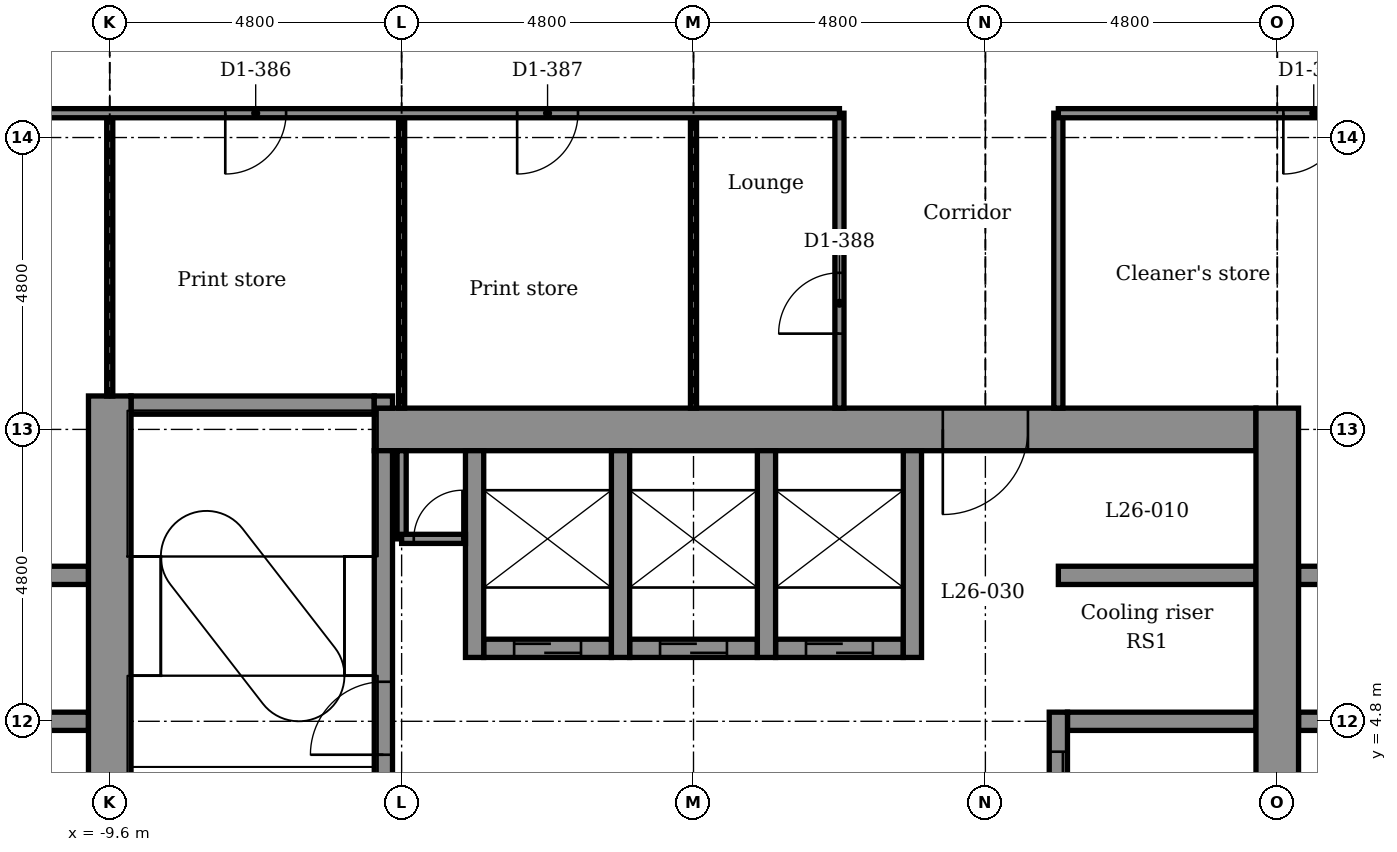
"""IFC4 building model, lengths in metres.
Left out: names, types, materials, properties, quantities, classifications, styles, units other than length and angle.
Written with IfcOpenShell. Run it as: python <this file> out.ifc"""

import sys

from ifc_helpers import new_model, si_unit, direction, frame, frame_2d, origin, place, context, subcontext, project, spatial, rectangle, extrude, element, fill, save


model = new_model("IFC4")
c1 = context("Model", 3, precision=1e-05, world=origin(), true_north=direction((0.0, 1.0)))
c2 = subcontext(c1, "Body", "Model", "MODEL_VIEW")
j1 = project(units=[si_unit("LENGTHUNIT", "METRE"), si_unit("PLANEANGLEUNIT", "RADIAN")], contexts=[c1])
p1 = place(None, origin())
s1 = spatial("IfcSite", under=j1, at=p1, CompositionType="ELEMENT")
p2 = place(p1, origin())
s2 = spatial("IfcBuilding", under=s1, at=p2, CompositionType="ELEMENT")
p3 = place(p2, frame((0.0, 0.0, 133.4)))
s3 = spatial("IfcBuildingStorey", under=s2, at=p3, CompositionType="ELEMENT", Elevation=133.4)
p4 = place(p3, frame((-14.25, 4.8, -0.15), z_axis=(0.0, 0.0, 1.0), x_axis=(1.0, 0.0, 0.0)))
e1 = element("IfcWall", 1, at=p4, inside=s3, PredefinedType="STANDARD", context=c2, shape_type="SweptSolid", body=[
    extrude(rectangle(XDim=4.3, YDim=0.3, at=frame_2d((2.15, 0.0))), origin(), (0.0, 0.0, 1.0), 4.55),
])
p5 = place(p3, frame((6.15, 4.8, -0.15), z_axis=(0.0, 0.0, 1.0), x_axis=(1.0, 0.0, 0.0)))
e2 = element("IfcWall", 2, at=p5, inside=s3, PredefinedType="STANDARD", context=c2, shape_type="SweptSolid", body=[
    extrude(rectangle(XDim=3.1, YDim=0.3, at=frame_2d((1.55, 0.0))), origin(), (0.0, 0.0, 1.0), 5.4),
])
p6 = place(p3, frame((9.95, 4.8, -0.15), z_axis=(0.0, 0.0, 1.0), x_axis=(1.0, 0.0, 0.0)))
e3 = element("IfcWall", 3, at=p6, inside=s3, PredefinedType="STANDARD", context=c2, shape_type="SweptSolid", body=[
    extrude(rectangle(XDim=4.3, YDim=0.3, at=frame_2d((2.15, 0.0))), origin(), (0.0, 0.0, 1.0), 4.55),
])
p7 = place(p3, frame((-3.45, 6.0, -0.15), z_axis=(0.0, 0.0, 1.0), x_axis=(1.0, 0.0, 0.0)))
e4 = element("IfcWall", 4, at=p7, inside=s3, PredefinedType="STANDARD", context=c2, shape_type="SweptSolid", body=[
    extrude(rectangle(XDim=2.1, YDim=0.3, at=frame_2d((1.05, 0.0))), origin(), (0.0, 0.0, 1.0), 5.4),
])
p8 = place(p7, frame((0.5, 0.0, 0.15)))
e5 = element("IfcOpeningElement", 5, at=p8, cuts=e4, PredefinedType="OPENING", context=c2, shape_type="SweptSolid", body=[
    extrude(rectangle(XDim=1.1, YDim=2.1, at=frame_2d((0.55, 1.05))), frame((0.0, 0.16, 0.0), z_axis=(0.0, -1.0, 0.0), x_axis=(1.0, 0.0, 0.0)), (0.0, 0.0, 1.0), 0.32),
])
p9 = place(p3, frame((-1.05, 6.0, -0.15), z_axis=(0.0, 0.0, 1.0), x_axis=(1.0, 0.0, 0.0)))
e6 = element("IfcWall", 6, at=p9, inside=s3, PredefinedType="STANDARD", context=c2, shape_type="SweptSolid", body=[
    extrude(rectangle(XDim=2.1, YDim=0.3, at=frame_2d((1.05, 0.0))), origin(), (0.0, 0.0, 1.0), 5.4),
])
p10 = place(p9, frame((0.5, 0.0, 0.15)))
e7 = element("IfcOpeningElement", 7, at=p10, cuts=e6, PredefinedType="OPENING", context=c2, shape_type="SweptSolid", body=[
    extrude(rectangle(XDim=1.1, YDim=2.1, at=frame_2d((0.55, 1.05))), frame((0.0, 0.16, 0.0), z_axis=(0.0, -1.0, 0.0), x_axis=(1.0, 0.0, 0.0)), (0.0, 0.0, 1.0), 0.32),
])
p11 = place(p3, frame((1.35, 6.0, -0.15), z_axis=(0.0, 0.0, 1.0), x_axis=(1.0, 0.0, 0.0)))
e8 = element("IfcWall", 8, at=p11, inside=s3, PredefinedType="STANDARD", context=c2, shape_type="SweptSolid", body=[
    extrude(rectangle(XDim=2.1, YDim=0.3, at=frame_2d((1.05, 0.0))), origin(), (0.0, 0.0, 1.0), 5.4),
])
p12 = place(p11, frame((0.5, 0.0, 0.15)))
e9 = element("IfcOpeningElement", 9, at=p12, cuts=e8, PredefinedType="OPENING", context=c2, shape_type="SweptSolid", body=[
    extrude(rectangle(XDim=1.1, YDim=2.1, at=frame_2d((0.55, 1.05))), frame((0.0, 0.16, 0.0), z_axis=(0.0, -1.0, 0.0), x_axis=(1.0, 0.0, 0.0)), (0.0, 0.0, 1.0), 0.32),
])
p13 = place(p3, frame((-14.25, 7.2, -0.15), z_axis=(0.0, 0.0, 1.0), x_axis=(1.0, 0.0, 0.0)))
e10 = element("IfcWall", 10, at=p13, inside=s3, PredefinedType="STANDARD", context=c2, shape_type="SweptSolid", body=[
    extrude(rectangle(XDim=4.3, YDim=0.3, at=frame_2d((2.15, 0.0))), origin(), (0.0, 0.0, 1.0), 4.55),
])
p14 = place(p3, frame((6.0, 7.2, -0.15), z_axis=(0.0, 0.0, 1.0), x_axis=(1.0, 0.0, 0.0)))
e11 = element("IfcWall", 11, at=p14, inside=s3, PredefinedType="STANDARD", context=c2, shape_type="SweptSolid", body=[
    extrude(rectangle(XDim=3.25, YDim=0.3, at=frame_2d((1.625, 0.0))), origin(), (0.0, 0.0, 1.0), 5.4),
])
p15 = place(p3, frame((9.95, 7.2, -0.15), z_axis=(0.0, 0.0, 1.0), x_axis=(1.0, 0.0, 0.0)))
e12 = element("IfcWall", 12, at=p15, inside=s3, PredefinedType="STANDARD", context=c2, shape_type="SweptSolid", body=[
    extrude(rectangle(XDim=4.3, YDim=0.3, at=frame_2d((2.15, 0.0))), origin(), (0.0, 0.0, 1.0), 4.55),
])
p16 = place(p3, frame((-5.25, 9.6, -0.15), z_axis=(0.0, 0.0, 1.0), x_axis=(1.0, 0.0, 0.0)))
e13 = element("IfcWall", 13, at=p16, inside=s3, PredefinedType="SHEAR", context=c2, shape_type="SweptSolid", body=[
    extrude(rectangle(XDim=14.5, YDim=0.7, at=frame_2d((7.25, 0.0))), origin(), (0.0, 0.0, 1.0), 5.4),
])
p17 = place(p16, frame((9.35, 0.0, 0.15)))
e14 = element("IfcOpeningElement", 14, at=p17, cuts=e13, PredefinedType="OPENING", context=c2, shape_type="SweptSolid", body=[
    extrude(rectangle(XDim=1.4, YDim=2.1, at=frame_2d((0.7, 1.05))), frame((0.0, 0.36, 0.0), z_axis=(0.0, -1.0, 0.0), x_axis=(1.0, 0.0, 0.0)), (0.0, 0.0, 1.0), 0.72),
])
p18 = place(p3, frame((-9.25, 10.0, -0.15), z_axis=(0.0, 0.0, 1.0), x_axis=(1.0, 0.0, 0.0)))
e15 = element("IfcWall", 15, at=p18, inside=s3, PredefinedType="STANDARD", context=c2, shape_type="SweptSolid", body=[
    extrude(rectangle(XDim=4.0, YDim=0.3, at=frame_2d((2.0, 0.0))), origin(), (0.0, 0.0, 1.0), 5.4),
])
p19 = place(p3, frame((-9.6, 2.55, -0.15), z_axis=(0.0, 0.0, 1.0), x_axis=(0.0, 1.0, 0.0)))
e16 = element("IfcWall", 16, at=p19, inside=s3, PredefinedType="SHEAR", context=c2, shape_type="SweptSolid", body=[
    extrude(rectangle(XDim=7.6, YDim=0.7, at=frame_2d((3.8, 0.0))), origin(), (0.0, 0.0, 1.0), 5.4),
])
p20 = place(p3, frame((-5.1, 2.25, -0.15), z_axis=(0.0, 0.0, 1.0), x_axis=(0.0, 1.0, 0.0)))
e17 = element("IfcWall", 17, at=p20, inside=s3, PredefinedType="STANDARD", context=c2, shape_type="SweptSolid", body=[
    extrude(rectangle(XDim=7.0, YDim=0.3, at=frame_2d((3.5, 0.0))), origin(), (0.0, 0.0, 1.0), 5.4),
])
p21 = place(p20, frame((2.0, 0.0, 0.15)))
e18 = element("IfcOpeningElement", 18, at=p21, cuts=e17, PredefinedType="OPENING", context=c2, shape_type="SweptSolid", body=[
    extrude(rectangle(XDim=1.2, YDim=2.1, at=frame_2d((0.6, 1.05))), frame((0.0, 0.16, 0.0), z_axis=(0.0, -1.0, 0.0), x_axis=(1.0, 0.0, 0.0)), (0.0, 0.0, 1.0), 0.32),
])
p22 = place(p3, frame((-5.1, 9.95, -0.15), z_axis=(0.0, 0.0, 1.0), x_axis=(0.0, 1.0, 0.0)))
e19 = element("IfcWall", 19, at=p22, inside=s3, PredefinedType="STANDARD", context=c2, shape_type="SweptSolid", body=[
    extrude(rectangle(XDim=0.2, YDim=0.3, at=frame_2d((0.1, 0.0))), origin(), (0.0, 0.0, 1.0), 5.4),
])
for number, where, z_axis, x_axis in (
    (20, (-3.6, 5.85, -0.15), (0.0, 0.0, 1.0), (0.0, 1.0, 0.0)),
    (21, (-1.2, 5.85, -0.15), (0.0, 0.0, 1.0), (0.0, 1.0, 0.0)),
    (22, (1.2, 5.85, -0.15), (0.0, 0.0, 1.0), (0.0, 1.0, 0.0)),
    (23, (3.6, 5.85, -0.15), (0.0, 0.0, 1.0), (0.0, 1.0, 0.0)),
):
    element("IfcWall", number, at=place(p3, frame(where, z_axis=z_axis, x_axis=x_axis)), inside=s3, PredefinedType="STANDARD", context=c2, shape_type="SweptSolid", body=[
        extrude(rectangle(XDim=3.4, YDim=0.3, at=frame_2d((1.7, 0.0))), origin(), (0.0, 0.0, 1.0), 5.4),
    ])
p23 = place(p3, frame((6.0, -2.55, -0.15), z_axis=(0.0, 0.0, 1.0), x_axis=(0.0, 1.0, 0.0)))
e24 = element("IfcWall", 24, at=p23, inside=s3, PredefinedType="STANDARD", context=c2, shape_type="SweptSolid", body=[
    extrude(rectangle(XDim=7.5, YDim=0.3, at=frame_2d((3.75, 0.0))), origin(), (0.0, 0.0, 1.0), 5.4),
])
p24 = place(p23, frame((0.65, 0.0, 0.15)))
e25 = element("IfcOpeningElement", 25, at=p24, cuts=e24, PredefinedType="OPENING", context=c2, shape_type="SweptSolid", body=[
    extrude(rectangle(XDim=1.4, YDim=2.1, at=frame_2d((0.7, 1.05))), frame((0.0, 0.16, 0.0), z_axis=(0.0, -1.0, 0.0), x_axis=(1.0, 0.0, 0.0)), (0.0, 0.0, 1.0), 0.32),
])
p25 = place(p23, frame((3.05, 0.0, 0.15)))
e26 = element("IfcOpeningElement", 26, at=p25, cuts=e24, PredefinedType="OPENING", context=c2, shape_type="SweptSolid", body=[
    extrude(rectangle(XDim=1.4, YDim=2.1, at=frame_2d((0.7, 1.05))), frame((0.0, 0.16, 0.0), z_axis=(0.0, -1.0, 0.0), x_axis=(1.0, 0.0, 0.0)), (0.0, 0.0, 1.0), 0.32),
])
p26 = place(p23, frame((5.45, 0.0, 0.15)))
e27 = element("IfcOpeningElement", 27, at=p26, cuts=e24, PredefinedType="OPENING", context=c2, shape_type="SweptSolid", body=[
    extrude(rectangle(XDim=1.4, YDim=2.1, at=frame_2d((0.7, 1.05))), frame((0.0, 0.16, 0.0), z_axis=(0.0, -1.0, 0.0), x_axis=(1.0, 0.0, 0.0)), (0.0, 0.0, 1.0), 0.32),
])
p27 = place(p3, frame((9.6, -10.15, -0.15), z_axis=(0.0, 0.0, 1.0), x_axis=(0.0, 1.0, 0.0)))
e28 = element("IfcWall", 28, at=p27, inside=s3, PredefinedType="SHEAR", context=c2, shape_type="SweptSolid", body=[
    extrude(rectangle(XDim=20.1, YDim=0.7, at=frame_2d((10.05, 0.0))), origin(), (0.0, 0.0, 1.0), 5.4),
])
p28 = place(p3, frame((6.0, 9.95, 0.0), z_axis=(0.0, 0.0, 1.0), x_axis=(0.0, 1.0, 0.0)))
e29 = element("IfcWall", 29, at=p28, inside=s3, PredefinedType="PARTITIONING", context=c2, shape_type="SweptSolid", body=[
    extrude(rectangle(XDim=4.85, YDim=0.15, at=frame_2d((2.425, 0.0))), origin(), (0.0, 0.0, 1.0), 5.25),
])
p29 = place(p3, frame((2.4, 9.95, 0.0), z_axis=(0.0, 0.0, 1.0), x_axis=(0.0, 1.0, 0.0)))
e30 = element("IfcWall", 30, at=p29, inside=s3, PredefinedType="PARTITIONING", context=c2, shape_type="SweptSolid", body=[
    extrude(rectangle(XDim=4.85, YDim=0.15, at=frame_2d((2.425, 0.0))), origin(), (0.0, 0.0, 1.0), 5.25),
])
p30 = place(p29, frame((1.225, 0.0, 0.0)))
e31 = element("IfcOpeningElement", 31, at=p30, cuts=e30, PredefinedType="OPENING", context=c2, shape_type="SweptSolid", body=[
    extrude(rectangle(XDim=1.0, YDim=2.1, at=frame_2d((0.5, 1.05))), frame((0.0, 0.085, 0.0), z_axis=(0.0, -1.0, 0.0), x_axis=(1.0, 0.0, 0.0)), (0.0, 0.0, 1.0), 0.17),
])
for number, where, z_axis, x_axis in (
    (32, (0.0, 9.95, 0.0), (0.0, 0.0, 1.0), (0.0, 1.0, 0.0)),
    (33, (-4.8, 9.95, 0.0), (0.0, 0.0, 1.0), (0.0, 1.0, 0.0)),
):
    element("IfcWall", number, at=place(p3, frame(where, z_axis=z_axis, x_axis=x_axis)), inside=s3, PredefinedType="PARTITIONING", context=c2, shape_type="SweptSolid", body=[
        extrude(rectangle(XDim=4.85, YDim=0.1, at=frame_2d((2.425, 0.0))), origin(), (0.0, 0.0, 1.0), 4.566),
    ])
p31 = place(p3, frame((-4.8, 7.8, 0.0), z_axis=(0.0, 0.0, 1.0), x_axis=(0.0, 1.0, 0.0)))
e34 = element("IfcWall", 34, at=p31, inside=s3, PredefinedType="PARTITIONING", context=c2, shape_type="SweptSolid", body=[
    extrude(rectangle(XDim=1.45, YDim=0.15, at=frame_2d((0.725, 0.0))), origin(), (0.0, 0.0, 1.0), 5.25),
])
p32 = place(p3, frame((-9.6, 10.15, 0.0), z_axis=(0.0, 0.0, 1.0), x_axis=(0.0, 1.0, 0.0)))
e35 = element("IfcWall", 35, at=p32, inside=s3, PredefinedType="PARTITIONING", context=c2, shape_type="SweptSolid", body=[
    extrude(rectangle(XDim=4.65, YDim=0.1, at=frame_2d((2.325, 0.0))), origin(), (0.0, 0.0, 1.0), 4.566),
])
p33 = place(p3, frame((-4.8, 7.8, 0.0), z_axis=(0.0, 0.0, 1.0), x_axis=(1.0, 0.0, 0.0)))
e36 = element("IfcWall", 36, at=p33, inside=s3, PredefinedType="PARTITIONING", context=c2, shape_type="SweptSolid", body=[
    extrude(rectangle(XDim=1.05, YDim=0.15, at=frame_2d((0.525, 0.0))), origin(), (0.0, 0.0, 1.0), 5.25),
])
p34 = place(p33, frame((0.2, 0.0, 0.0)))
e37 = element("IfcOpeningElement", 37, at=p34, cuts=e36, PredefinedType="OPENING", context=c2, shape_type="SweptSolid", body=[
    extrude(rectangle(XDim=0.8, YDim=2.1, at=frame_2d((0.4, 1.05))), frame((0.0, 0.085, 0.0), z_axis=(0.0, -1.0, 0.0), x_axis=(1.0, 0.0, 0.0)), (0.0, 0.0, 1.0), 0.17),
])
p35 = place(p3, frame((-14.4, 14.8, 0.0), z_axis=(0.0, 0.0, 1.0), x_axis=(1.0, 0.0, 0.0)))
e38 = element("IfcWall", 38, at=p35, inside=s3, PredefinedType="PARTITIONING", context=c2, shape_type="SweptSolid", body=[
    extrude(rectangle(XDim=16.8, YDim=0.15, at=frame_2d((8.4, 0.0))), origin(), (0.0, 0.0, 1.0), 5.25),
])
p36 = place(p35, frame((1.9, 0.0, 0.0)))
e39 = element("IfcOpeningElement", 39, at=p36, cuts=e38, PredefinedType="OPENING", context=c2, shape_type="SweptSolid", body=[
    extrude(rectangle(XDim=1.0, YDim=2.1, at=frame_2d((0.5, 1.05))), frame((0.0, 0.085, 0.0), z_axis=(0.0, -1.0, 0.0), x_axis=(1.0, 0.0, 0.0)), (0.0, 0.0, 1.0), 0.17),
])
p37 = place(p35, frame((6.7, 0.0, 0.0)))
e40 = element("IfcOpeningElement", 40, at=p37, cuts=e38, PredefinedType="OPENING", context=c2, shape_type="SweptSolid", body=[
    extrude(rectangle(XDim=1.0, YDim=2.1, at=frame_2d((0.5, 1.05))), frame((0.0, 0.085, 0.0), z_axis=(0.0, -1.0, 0.0), x_axis=(1.0, 0.0, 0.0)), (0.0, 0.0, 1.0), 0.17),
])
p38 = place(p35, frame((11.5, 0.0, 0.0)))
e41 = element("IfcOpeningElement", 41, at=p38, cuts=e38, PredefinedType="OPENING", context=c2, shape_type="SweptSolid", body=[
    extrude(rectangle(XDim=1.0, YDim=2.1, at=frame_2d((0.5, 1.05))), frame((0.0, 0.085, 0.0), z_axis=(0.0, -1.0, 0.0), x_axis=(1.0, 0.0, 0.0)), (0.0, 0.0, 1.0), 0.17),
])
p39 = place(p3, frame((6.0, 14.8, 0.0), z_axis=(0.0, 0.0, 1.0), x_axis=(1.0, 0.0, 0.0)))
e42 = element("IfcWall", 42, at=p39, inside=s3, PredefinedType="PARTITIONING", context=c2, shape_type="SweptSolid", body=[
    extrude(rectangle(XDim=8.4, YDim=0.15, at=frame_2d((4.2, 0.0))), origin(), (0.0, 0.0, 1.0), 5.25),
])
p40 = place(p39, frame((3.7, 0.0, 0.0)))
e43 = element("IfcOpeningElement", 43, at=p40, cuts=e42, PredefinedType="OPENING", context=c2, shape_type="SweptSolid", body=[
    extrude(rectangle(XDim=1.0, YDim=2.1, at=frame_2d((0.5, 1.05))), frame((0.0, 0.085, 0.0), z_axis=(0.0, -1.0, 0.0), x_axis=(1.0, 0.0, 0.0)), (0.0, 0.0, 1.0), 0.17),
])
p41 = place(p34, origin())
e44 = element("IfcDoor", 44, at=p41, inside=s3, OperationType="SINGLE_SWING_RIGHT", PredefinedType="DOOR", context=c2, shape_type="SweptSolid", body=[
    extrude(rectangle(XDim=0.8, YDim=2.1, at=frame_2d((0.4, 1.05))), frame((0.0, 0.025, 0.0), z_axis=(0.0, -1.0, 0.0), x_axis=(1.0, 0.0, 0.0)), (0.0, 0.0, 1.0), 0.05),
])
fill(e37, e44)
p42 = place(p40, frame((1.0, 0.0, 0.0), z_axis=(0.0, 0.0, 1.0), x_axis=(-1.0, 0.0, 0.0)))
e45 = element("IfcDoor", 45, at=p42, inside=s3, OperationType="SINGLE_SWING_LEFT", PredefinedType="DOOR", context=c2, shape_type="SweptSolid", body=[
    extrude(rectangle(XDim=1.0, YDim=2.1, at=frame_2d((0.5, 1.05))), frame((0.0, 0.025, 0.0), z_axis=(0.0, -1.0, 0.0), x_axis=(1.0, 0.0, 0.0)), (0.0, 0.0, 1.0), 0.05),
])
fill(e43, e45)
p43 = place(p37, frame((1.0, 0.0, 0.0), z_axis=(0.0, 0.0, 1.0), x_axis=(-1.0, 0.0, 0.0)))
e46 = element("IfcDoor", 46, at=p43, inside=s3, OperationType="SINGLE_SWING_LEFT", PredefinedType="DOOR", context=c2, shape_type="SweptSolid", body=[
    extrude(rectangle(XDim=1.0, YDim=2.1, at=frame_2d((0.5, 1.05))), frame((0.0, 0.025, 0.0), z_axis=(0.0, -1.0, 0.0), x_axis=(1.0, 0.0, 0.0)), (0.0, 0.0, 1.0), 0.05),
])
fill(e40, e46)
p44 = place(p38, frame((1.0, 0.0, 0.0), z_axis=(0.0, 0.0, 1.0), x_axis=(-1.0, 0.0, 0.0)))
e47 = element("IfcDoor", 47, at=p44, inside=s3, OperationType="SINGLE_SWING_LEFT", PredefinedType="DOOR", context=c2, shape_type="SweptSolid", body=[
    extrude(rectangle(XDim=1.0, YDim=2.1, at=frame_2d((0.5, 1.05))), frame((0.0, 0.025, 0.0), z_axis=(0.0, -1.0, 0.0), x_axis=(1.0, 0.0, 0.0)), (0.0, 0.0, 1.0), 0.05),
])
fill(e41, e47)
p45 = place(p30, origin())
e48 = element("IfcDoor", 48, at=p45, inside=s3, OperationType="SINGLE_SWING_LEFT", PredefinedType="DOOR", context=c2, shape_type="SweptSolid", body=[
    extrude(rectangle(XDim=1.0, YDim=2.1, at=frame_2d((0.5, 1.05))), frame((0.0, 0.025, 0.0), z_axis=(0.0, -1.0, 0.0), x_axis=(1.0, 0.0, 0.0)), (0.0, 0.0, 1.0), 0.05),
])
fill(e31, e48)
p46 = place(p26, origin())
e49 = element("IfcDoor", 49, at=p46, inside=s3, OperationType="DOUBLE_DOOR_SLIDING", PredefinedType="DOOR", context=c2, shape_type="SweptSolid", body=[
    extrude(rectangle(XDim=1.4, YDim=2.1, at=frame_2d((0.7, 1.05))), frame((0.0, 0.025, 0.0), z_axis=(0.0, -1.0, 0.0), x_axis=(1.0, 0.0, 0.0)), (0.0, 0.0, 1.0), 0.05),
])
fill(e27, e49)
p47 = place(p8, origin())
e50 = element("IfcDoor", 50, at=p47, inside=s3, OperationType="DOUBLE_DOOR_SLIDING", PredefinedType="DOOR", context=c2, shape_type="SweptSolid", body=[
    extrude(rectangle(XDim=1.1, YDim=2.1, at=frame_2d((0.55, 1.05))), frame((0.0, 0.025, 0.0), z_axis=(0.0, -1.0, 0.0), x_axis=(1.0, 0.0, 0.0)), (0.0, 0.0, 1.0), 0.05),
])
fill(e5, e50)
p48 = place(p10, origin())
e51 = element("IfcDoor", 51, at=p48, inside=s3, OperationType="DOUBLE_DOOR_SLIDING", PredefinedType="DOOR", context=c2, shape_type="SweptSolid", body=[
    extrude(rectangle(XDim=1.1, YDim=2.1, at=frame_2d((0.55, 1.05))), frame((0.0, 0.025, 0.0), z_axis=(0.0, -1.0, 0.0), x_axis=(1.0, 0.0, 0.0)), (0.0, 0.0, 1.0), 0.05),
])
fill(e7, e51)
p49 = place(p12, origin())
e52 = element("IfcDoor", 52, at=p49, inside=s3, OperationType="DOUBLE_DOOR_SLIDING", PredefinedType="DOOR", context=c2, shape_type="SweptSolid", body=[
    extrude(rectangle(XDim=1.1, YDim=2.1, at=frame_2d((0.55, 1.05))), frame((0.0, 0.025, 0.0), z_axis=(0.0, -1.0, 0.0), x_axis=(1.0, 0.0, 0.0)), (0.0, 0.0, 1.0), 0.05),
])
fill(e9, e52)
p50 = place(p21, origin())
e53 = element("IfcDoor", 53, at=p50, inside=s3, OperationType="SINGLE_SWING_LEFT", PredefinedType="DOOR", context=c2, shape_type="SweptSolid", body=[
    extrude(rectangle(XDim=1.2, YDim=2.1, at=frame_2d((0.6, 1.05))), frame((0.0, 0.025, 0.0), z_axis=(0.0, -1.0, 0.0), x_axis=(1.0, 0.0, 0.0)), (0.0, 0.0, 1.0), 0.05),
])
fill(e18, e53)
p51 = place(p17, frame((1.4, 0.0, 0.0), z_axis=(0.0, 0.0, 1.0), x_axis=(-1.0, 0.0, 0.0)))
e54 = element("IfcDoor", 54, at=p51, inside=s3, OperationType="SINGLE_SWING_LEFT", PredefinedType="DOOR", context=c2, shape_type="SweptSolid", body=[
    extrude(rectangle(XDim=1.4, YDim=2.1, at=frame_2d((0.7, 1.05))), frame((0.0, 0.025, 0.0), z_axis=(0.0, -1.0, 0.0), x_axis=(1.0, 0.0, 0.0)), (0.0, 0.0, 1.0), 0.05),
])
fill(e14, e54)
save(model, sys.argv[1])
